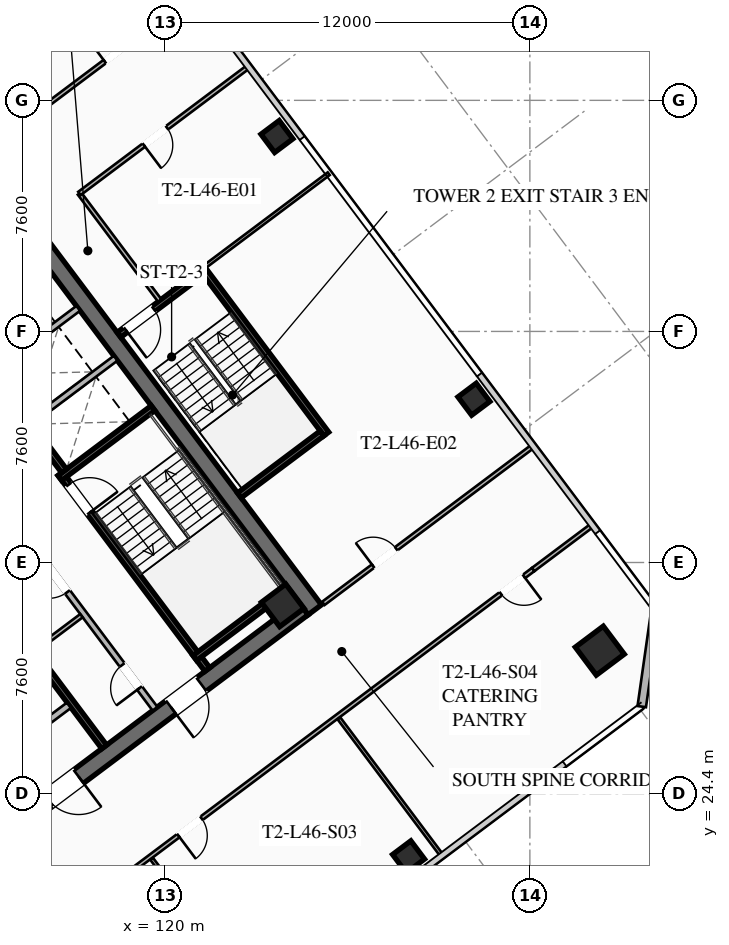
"""IFC4 building model, lengths in metres.
Left out: names, types, materials, properties, quantities, classifications, styles, units other than length and angle.
Written with IfcOpenShell. Run it as: python <this file> out.ifc"""

import sys

from ifc_helpers import new_model, si_unit, direction, frame, frame_2d, origin, origin_2d, place, context, subcontext, project, spatial, rectangle, hollow_rectangle, extrude, element, fill, save


model = new_model("IFC4")
c1 = context("Model", 3, precision=1e-05, world=origin(), true_north=direction((0.0, 1.0)))
c2 = subcontext(c1, "Body", "Model", "MODEL_VIEW")
j1 = project(units=[si_unit("LENGTHUNIT", "METRE"), si_unit("PLANEANGLEUNIT", "RADIAN")], contexts=[c1])
p1 = place(None, origin())
s1 = spatial("IfcSite", under=j1, at=p1, CompositionType="ELEMENT")
p2 = place(p1, origin())
s2 = spatial("IfcBuilding", under=s1, at=p2, CompositionType="ELEMENT")
p3 = place(p2, frame((0.0, 0.0, 171.2)))
s3 = spatial("IfcBuildingStorey", under=s2, at=p3, CompositionType="ELEMENT", Elevation=171.2)
p4 = place(p3, frame((115.564, 42.923, 0.0), z_axis=(0.0, 0.0, 1.0), x_axis=(0.600005007985, -0.799996243986, 0.0)))
e1 = element("IfcWall", 1, at=p4, inside=s3, PredefinedType="SHEAR", context=c2, shape_type="SweptSolid", body=[
    extrude(rectangle(XDim=15.6, YDim=0.55, at=frame_2d((7.8, 0.0))), origin(), (0.0, 0.0, 1.0), 3.55),
])
p5 = place(p3, frame((124.539, 30.498, 0.0), z_axis=(0.0, 0.0, 1.0), x_axis=(-0.799998054672, -0.600002593761, 0.0)))
e2 = element("IfcWall", 2, at=p5, inside=s3, PredefinedType="SHEAR", context=c2, shape_type="SweptSolid", body=[
    extrude(rectangle(XDim=15.06, YDim=0.55, at=frame_2d((7.53, 0.0))), origin(), (0.0, 0.0, 1.0), 3.55),
])
p6 = place(p5, frame((9.23, 0.0, 0.0)))
e3 = element("IfcOpeningElement", 3, at=p6, cuts=e2, PredefinedType="OPENING", context=c2, shape_type="SweptSolid", body=[
    extrude(rectangle(XDim=1.25, YDim=2.25, at=frame_2d((0.625, 1.125))), frame((0.0, 0.285, 0.0), z_axis=(0.0, -1.0, 0.0), x_axis=(1.0, 0.0, 0.0)), (0.0, 0.0, 1.0), 0.57),
])
p7 = place(p5, frame((4.18, 0.0, 0.0)))
e4 = element("IfcOpeningElement", 4, at=p7, cuts=e2, PredefinedType="OPENING", context=c2, shape_type="SweptSolid", body=[
    extrude(rectangle(XDim=1.25, YDim=2.25, at=frame_2d((0.625, 1.125))), frame((0.0, 0.285, 0.0), z_axis=(0.0, -1.0, 0.0), x_axis=(1.0, 0.0, 0.0)), (0.0, 0.0, 1.0), 0.57),
])
p8 = place(p3, frame((123.87, 30.59, 0.0), z_axis=(0.0, 0.0, 1.0), x_axis=(0.799999996291, 0.600000004945, 0.0)))
e5 = element("IfcColumn", 5, at=p8, inside=s3, PredefinedType="COLUMN", context=c2, shape_type="SweptSolid", body=[
    extrude(hollow_rectangle(XDim=1.0, YDim=1.0, WallThickness=0.04, at=origin_2d()), origin(), (0.0, 0.0, 1.0), 3.37),
])
p9 = place(p3, frame((134.3, 29.1, 0.0), z_axis=(0.0, 0.0, 1.0), x_axis=(0.799999996291, 0.600000004945, 0.0)))
e6 = element("IfcColumn", 6, at=p9, inside=s3, PredefinedType="COLUMN", context=c2, shape_type="SweptSolid", body=[
    extrude(hollow_rectangle(XDim=1.15, YDim=1.15, WallThickness=0.045, at=origin_2d()), origin(), (0.0, 0.0, 1.0), 3.37),
])
for number, where, z_axis, x_axis in (
    (7, (128.01, 22.32, 0.0), (0.0, 0.0, 1.0), (0.8, 0.6, 0.0)),
    (8, (130.16, 37.37, 0.0), (0.0, 0.0, 1.0), (0.8, 0.6, 0.0)),
    (9, (123.68, 46.01, 0.0), (0.0, 0.0, 1.0), (0.8, 0.6, 0.0)),
):
    element("IfcColumn", number, at=place(p3, frame(where, z_axis=z_axis, x_axis=x_axis)), inside=s3, PredefinedType="COLUMN", context=c2, shape_type="SweptSolid", body=[
        extrude(hollow_rectangle(XDim=0.75, YDim=0.75, WallThickness=0.032, at=origin_2d()), origin(), (0.0, 0.0, 1.0), 3.37),
    ])
p10 = place(p3, frame((136.14, 30.48, 0.0), z_axis=(0.0, 0.0, 1.0), x_axis=(-0.141410847992, -0.989950994782, 0.0)))
e10 = element("IfcWall", 10, at=p10, inside=s3, PredefinedType="SOLIDWALL", context=c2, shape_type="SweptSolid", body=[
    extrude(rectangle(XDim=3.253, YDim=0.28, at=frame_2d((1.626, 0.0))), origin(), (0.0, 0.0, 1.0), 3.37),
])
p11 = place(p3, frame((116.56, 34.92, 0.0), z_axis=(0.0, 0.0, 1.0), x_axis=(0.59999029481, -0.8000072788, 0.0)))
e11 = element("IfcWall", 11, at=p11, inside=s3, PredefinedType="SHEAR", context=c2, shape_type="SweptSolid", body=[
    extrude(rectangle(XDim=8.05, YDim=0.2, at=frame_2d((4.025, 0.0))), origin(), (0.0, 0.0, 1.0), 3.37),
])
p12 = place(p11, frame((0.45, 0.0, 0.0)))
e12 = element("IfcOpeningElement", 12, at=p12, cuts=e11, PredefinedType="OPENING", context=c2, shape_type="SweptSolid", body=[
    extrude(rectangle(XDim=1.15, YDim=2.2, at=frame_2d((0.575, 1.1))), frame((0.0, 0.11, 0.0), z_axis=(0.0, -1.0, 0.0), x_axis=(1.0, 0.0, 0.0)), (0.0, 0.0, 1.0), 0.22),
])
for number, where, z_axis, x_axis in (
    (13, (116.54, 34.78, 0.0), (0.0, 0.0, 1.0), (0.8, 0.6, 0.0)),
    (14, (120.98, 28.86, 0.0), (0.0, 0.0, 1.0), (0.8, 0.6, 0.0)),
):
    element("IfcWall", number, at=place(p3, frame(where, z_axis=z_axis, x_axis=x_axis)), inside=s3, PredefinedType="SHEAR", context=c2, shape_type="SweptSolid", body=[
        extrude(rectangle(XDim=3.83, YDim=0.2, at=frame_2d((1.915, 0.0))), origin(), (0.0, 0.0, 1.0), 3.37),
    ])
p13 = place(p3, frame((117.998, 25.936, 0.0), z_axis=(0.0, 0.0, 1.0), x_axis=(-0.600002693989, 0.799997979501, 0.0)))
e15 = element("IfcWall", 15, at=p13, inside=s3, PredefinedType="SHEAR", context=c2, shape_type="SweptSolid", body=[
    extrude(rectangle(XDim=14.5, YDim=0.2, at=frame_2d((7.25, 0.0))), origin(), (0.0, 0.0, 1.0), 3.37),
])
p14 = place(p3, frame((114.316, 25.412, 0.0), z_axis=(0.0, 0.0, 1.0), x_axis=(0.800018601094, 0.59997519774, 0.0)))
e16 = element("IfcWall", 16, at=p14, inside=s3, PredefinedType="SOLIDWALL", context=c2, shape_type="SweptSolid", body=[
    extrude(rectangle(XDim=3.15, YDim=0.22, at=frame_2d((1.575, 0.0))), origin(), (0.0, 0.0, 1.0), 2.723),
])
p15 = place(p14, frame((0.95, 0.0, 0.0)))
e17 = element("IfcOpeningElement", 17, at=p15, cuts=e16, PredefinedType="OPENING", context=c2, shape_type="SweptSolid", body=[
    extrude(rectangle(XDim=1.25, YDim=2.25, at=frame_2d((0.625, 1.125))), frame((0.0, 0.12, 0.0), z_axis=(0.0, -1.0, 0.0), x_axis=(1.0, 0.0, 0.0)), (0.0, 0.0, 1.0), 0.24),
])
p16 = place(p3, frame((112.81, 40.17, 0.0), z_axis=(0.0, 0.0, 1.0), x_axis=(0.599993943644, -0.800004542231, 0.0)))
e18 = element("IfcWall", 18, at=p16, inside=s3, PredefinedType="SHEAR", context=c2, shape_type="SweptSolid", body=[
    extrude(rectangle(XDim=6.45, YDim=0.2, at=frame_2d((3.225, 0.0))), origin(), (0.0, 0.0, 1.0), 3.37),
])
for number, where, z_axis, x_axis in (
    (19, (115.59, 36.63, 0.0), (0.0, 0.0, 1.0), (0.8, 0.6, 0.0)),
    (20, (114.36, 38.27, 0.0), (0.0, 0.0, 1.0), (0.8, 0.6, 0.0)),
):
    element("IfcWall", number, at=place(p3, frame(where, z_axis=z_axis, x_axis=x_axis)), inside=s3, PredefinedType="SOLIDWALL", context=c2, shape_type="SweptSolid", body=[
        extrude(rectangle(XDim=3.48, YDim=0.2, at=frame_2d((1.74, 0.0))), origin(), (0.0, 0.0, 1.0), 3.37),
    ])
p17 = place(p3, frame((119.67, 27.19, 0.0), z_axis=(0.0, 0.0, 1.0), x_axis=(-0.599988677396, 0.800008491828, 0.0)))
e21 = element("IfcWall", 21, at=p17, inside=s3, PredefinedType="SOLIDWALL", context=c2, shape_type="SweptSolid", body=[
    extrude(rectangle(XDim=6.9, YDim=0.2, at=frame_2d((3.45, 0.0))), origin(), (0.0, 0.0, 1.0), 2.723),
])
p18 = place(p17, frame((0.85, 0.0, 0.0)))
e22 = element("IfcOpeningElement", 22, at=p18, cuts=e21, PredefinedType="OPENING", context=c2, shape_type="SweptSolid", body=[
    extrude(rectangle(XDim=0.95, YDim=2.05, at=frame_2d((0.475, 1.025))), frame((0.0, 0.11, 0.0), z_axis=(0.0, -1.0, 0.0), x_axis=(1.0, 0.0, 0.0)), (0.0, 0.0, 1.0), 0.22),
])
p19 = place(p17, frame((4.8, 0.0, 0.0)))
e23 = element("IfcOpeningElement", 23, at=p19, cuts=e21, PredefinedType="OPENING", context=c2, shape_type="SweptSolid", body=[
    extrude(rectangle(XDim=1.05, YDim=2.2, at=frame_2d((0.525, 1.1))), frame((0.0, 0.11, 0.0), z_axis=(0.0, -1.0, 0.0), x_axis=(1.0, 0.0, 0.0)), (0.0, 0.0, 1.0), 0.22),
])
p20 = place(p3, frame((115.746, 29.122, 0.0), z_axis=(0.0, 0.0, 1.0), x_axis=(0.8, 0.6, 0.0)))
e24 = element("IfcWall", 24, at=p20, inside=s3, PredefinedType="PARTITIONING", context=c2, shape_type="SweptSolid", body=[
    extrude(rectangle(XDim=1.88, YDim=0.135, at=frame_2d((0.94, 0.0))), origin(), (0.0, 0.0, 1.0), 2.723),
])
p21 = place(p3, frame((125.304, 36.228, 0.0), z_axis=(0.0, 0.0, 1.0), x_axis=(-0.59998851072, 0.800008616831, 0.0)))
e25 = element("IfcWall", 25, at=p21, inside=s3, PredefinedType="SHEAR", context=c2, shape_type="SweptSolid", body=[
    extrude(rectangle(XDim=6.8, YDim=0.2, at=frame_2d((3.4, 0.0))), origin(), (0.0, 0.0, 1.0), 3.37),
])
p22 = place(p3, frame((121.204, 41.528, 0.0), z_axis=(0.0, 0.0, 1.0), x_axis=(-0.800017232136, -0.599977023131, 0.0)))
e26 = element("IfcWall", 26, at=p22, inside=s3, PredefinedType="SHEAR", context=c2, shape_type="SweptSolid", body=[
    extrude(rectangle(XDim=3.4, YDim=0.2, at=frame_2d((1.7, 0.0))), origin(), (0.0, 0.0, 1.0), 3.37),
])
p23 = place(p22, frame((1.975, 0.0, 0.0)))
e27 = element("IfcOpeningElement", 27, at=p23, cuts=e26, PredefinedType="OPENING", context=c2, shape_type="SweptSolid", body=[
    extrude(rectangle(XDim=1.15, YDim=2.2, at=frame_2d((0.575, 1.1))), frame((0.0, 0.11, 0.0), z_axis=(0.0, -1.0, 0.0), x_axis=(1.0, 0.0, 0.0)), (0.0, 0.0, 1.0), 0.22),
])
p24 = place(p3, frame((122.444, 34.208, 0.0), z_axis=(0.0, 0.0, 1.0), x_axis=(0.79999138319, 0.600011488909, 0.0)))
e28 = element("IfcWall", 28, at=p24, inside=s3, PredefinedType="SHEAR", context=c2, shape_type="SweptSolid", body=[
    extrude(rectangle(XDim=3.4, YDim=0.2, at=frame_2d((1.7, 0.0))), origin(), (0.0, 0.0, 1.0), 3.37),
])
p25 = place(p3, frame((119.824, 40.618, 0.0), z_axis=(0.0, 0.0, 1.0), x_axis=(-0.599982243973, 0.800013316712, 0.0)))
e29 = element("IfcWall", 29, at=p25, inside=s3, PredefinedType="PARTITIONING", context=c2, shape_type="SweptSolid", body=[
    extrude(rectangle(XDim=4.4, YDim=0.135, at=frame_2d((2.2, 0.0))), origin(), (0.0, 0.0, 1.0), 2.723),
])
p26 = place(p3, frame((96.058, 32.006, 0.0), z_axis=(0.0, 0.0, 1.0), x_axis=(0.8, 0.6, 0.0)))
e30 = element("IfcWall", 30, at=p26, inside=s3, PredefinedType="PARTITIONING", context=c2, shape_type="SweptSolid", body=[
    extrude(rectangle(XDim=28.7, YDim=0.135, at=frame_2d((14.35, 0.0))), origin(), (0.0, 0.0, 1.0), 2.723),
])
p27 = place(p26, frame((0.3, 0.0, 0.0)))
e31 = element("IfcOpeningElement", 31, at=p27, cuts=e30, PredefinedType="OPENING", context=c2, shape_type="SweptSolid", body=[
    extrude(rectangle(XDim=0.95, YDim=2.05, at=frame_2d((0.475, 1.025))), frame((0.0, 0.077, 0.0), z_axis=(0.0, -1.0, 0.0), x_axis=(1.0, 0.0, 0.0)), (0.0, 0.0, 1.0), 0.155),
])
p28 = place(p26, frame((10.01, 0.0, 0.0)))
e32 = element("IfcOpeningElement", 32, at=p28, cuts=e30, PredefinedType="OPENING", context=c2, shape_type="SweptSolid", body=[
    extrude(rectangle(XDim=0.95, YDim=2.05, at=frame_2d((0.475, 1.025))), frame((0.0, 0.077, 0.0), z_axis=(0.0, -1.0, 0.0), x_axis=(1.0, 0.0, 0.0)), (0.0, 0.0, 1.0), 0.155),
])
p29 = place(p26, frame((14.033, 0.0, 0.0)))
e33 = element("IfcOpeningElement", 33, at=p29, cuts=e30, PredefinedType="OPENING", context=c2, shape_type="SweptSolid", body=[
    extrude(rectangle(XDim=0.95, YDim=2.05, at=frame_2d((0.475, 1.025))), frame((0.0, 0.077, 0.0), z_axis=(0.0, -1.0, 0.0), x_axis=(1.0, 0.0, 0.0)), (0.0, 0.0, 1.0), 0.155),
])
p30 = place(p26, frame((27.45, 0.0, 0.0)))
e34 = element("IfcOpeningElement", 34, at=p30, cuts=e30, PredefinedType="OPENING", context=c2, shape_type="SweptSolid", body=[
    extrude(rectangle(XDim=0.95, YDim=2.05, at=frame_2d((0.475, 1.025))), frame((0.0, 0.077, 0.0), z_axis=(0.0, -1.0, 0.0), x_axis=(1.0, 0.0, 0.0)), (0.0, 0.0, 1.0), 0.155),
])
p31 = place(p3, frame((132.11, 31.77, 0.0), z_axis=(0.0, 0.0, 1.0), x_axis=(-0.800003062365, -0.599995916825, 0.0)))
e35 = element("IfcWall", 35, at=p31, inside=s3, PredefinedType="PARTITIONING", context=c2, shape_type="SweptSolid", body=[
    extrude(rectangle(XDim=28.7, YDim=0.135, at=frame_2d((14.35, 0.0))), origin(), (0.0, 0.0, 1.0), 2.723),
])
p32 = place(p31, frame((27.37, 0.0, 0.0)))
e36 = element("IfcOpeningElement", 36, at=p32, cuts=e35, PredefinedType="OPENING", context=c2, shape_type="SweptSolid", body=[
    extrude(rectangle(XDim=0.95, YDim=2.05, at=frame_2d((0.475, 1.025))), frame((0.0, 0.077, 0.0), z_axis=(0.0, -1.0, 0.0), x_axis=(1.0, 0.0, 0.0)), (0.0, 0.0, 1.0), 0.155),
])
p33 = place(p31, frame((17.698, 0.0, 0.0)))
e37 = element("IfcOpeningElement", 37, at=p33, cuts=e35, PredefinedType="OPENING", context=c2, shape_type="SweptSolid", body=[
    extrude(rectangle(XDim=0.95, YDim=2.05, at=frame_2d((0.475, 1.025))), frame((0.0, 0.077, 0.0), z_axis=(0.0, -1.0, 0.0), x_axis=(1.0, 0.0, 0.0)), (0.0, 0.0, 1.0), 0.155),
])
p34 = place(p31, frame((13.639, 0.0, 0.0)))
e38 = element("IfcOpeningElement", 38, at=p34, cuts=e35, PredefinedType="OPENING", context=c2, shape_type="SweptSolid", body=[
    extrude(rectangle(XDim=0.95, YDim=2.05, at=frame_2d((0.475, 1.025))), frame((0.0, 0.077, 0.0), z_axis=(0.0, -1.0, 0.0), x_axis=(1.0, 0.0, 0.0)), (0.0, 0.0, 1.0), 0.155),
])
p35 = place(p31, frame((0.38, 0.0, 0.0)))
e39 = element("IfcOpeningElement", 39, at=p35, cuts=e35, PredefinedType="OPENING", context=c2, shape_type="SweptSolid", body=[
    extrude(rectangle(XDim=0.95, YDim=2.05, at=frame_2d((0.475, 1.025))), frame((0.0, 0.077, 0.0), z_axis=(0.0, -1.0, 0.0), x_axis=(1.0, 0.0, 0.0)), (0.0, 0.0, 1.0), 0.155),
])
p36 = place(p3, frame((132.11, 31.77, 0.0), z_axis=(0.0, 0.0, 1.0), x_axis=(0.799975885537, 0.600032151272, 0.0)))
e40 = element("IfcWall", 40, at=p36, inside=s3, PredefinedType="PARTITIONING", context=c2, shape_type="SweptSolid", body=[
    extrude(rectangle(XDim=2.43, YDim=0.135, at=frame_2d((1.215, 0.0))), origin(), (0.0, 0.0, 1.0), 2.723),
])
for number, where, z_axis, x_axis in (
    (41, (122.948, 17.736, 0.0), (0.0, 0.0, 1.0), (-0.6, 0.8, 0.0)),
    (42, (129.108, 22.356, 0.0), (0.0, 0.0, 1.0), (-0.6, 0.8, 0.0)),
):
    element("IfcWall", number, at=place(p3, frame(where, z_axis=z_axis, x_axis=x_axis)), inside=s3, PredefinedType="PARTITIONING", context=c2, shape_type="SweptSolid", body=[
        extrude(rectangle(XDim=5.65, YDim=0.11, at=frame_2d((2.825, 0.0))), origin(), (0.0, 0.0, 1.0), 2.723),
    ])
p37 = place(p3, frame((122.744, 48.308, 0.0), z_axis=(0.0, 0.0, 1.0), x_axis=(-0.79997892247, -0.600028102345, 0.0)))
e43 = element("IfcWall", 43, at=p37, inside=s3, PredefinedType="PARTITIONING", context=c2, shape_type="SweptSolid", body=[
    extrude(rectangle(XDim=6.95, YDim=0.135, at=frame_2d((3.475, 0.0))), origin(), (0.0, 0.0, 1.0), 2.723),
])
p38 = place(p37, frame((3.35, 0.0, 0.0)))
e44 = element("IfcOpeningElement", 44, at=p38, cuts=e43, PredefinedType="OPENING", context=c2, shape_type="SweptSolid", body=[
    extrude(rectangle(XDim=0.95, YDim=2.05, at=frame_2d((0.475, 1.025))), frame((0.0, 0.077, 0.0), z_axis=(0.0, -1.0, 0.0), x_axis=(1.0, 0.0, 0.0)), (0.0, 0.0, 1.0), 0.155),
])
p39 = place(p3, frame((125.208, 30.656, 0.0), z_axis=(0.0, 0.0, 1.0), x_axis=(0.800006797429, 0.599990936654, 0.0)))
e45 = element("IfcWall", 45, at=p39, inside=s3, PredefinedType="PARTITIONING", context=c2, shape_type="SweptSolid", body=[
    extrude(rectangle(XDim=8.62, YDim=0.135, at=frame_2d((4.31, 0.0))), origin(), (0.0, 0.0, 1.0), 2.723),
])
p40 = place(p39, frame((2.045, 0.0, 0.0)))
e46 = element("IfcOpeningElement", 46, at=p40, cuts=e45, PredefinedType="OPENING", context=c2, shape_type="SweptSolid", body=[
    extrude(rectangle(XDim=0.95, YDim=2.05, at=frame_2d((0.475, 1.025))), frame((0.0, 0.077, 0.0), z_axis=(0.0, -1.0, 0.0), x_axis=(1.0, 0.0, 0.0)), (0.0, 0.0, 1.0), 0.155),
])
p41 = place(p3, frame((125.384, 44.788, 0.0), z_axis=(0.0, 0.0, 1.0), x_axis=(-0.8, -0.6, 0.0)))
e47 = element("IfcWall", 47, at=p41, inside=s3, PredefinedType="PARTITIONING", context=c2, shape_type="SweptSolid", body=[
    extrude(rectangle(XDim=5.1, YDim=0.11, at=frame_2d((2.55, 0.0))), origin(), (0.0, 0.0, 1.0), 2.723),
])
p42 = place(p6, origin())
e48 = element("IfcDoor", 48, at=p42, inside=s3, OperationType="SINGLE_SWING_LEFT", PredefinedType="DOOR", context=c2, shape_type="SweptSolid", body=[
    extrude(rectangle(XDim=1.25, YDim=2.25, at=frame_2d((0.625, 1.125))), frame((0.0, 0.025, 0.0), z_axis=(0.0, -1.0, 0.0), x_axis=(1.0, 0.0, 0.0)), (0.0, 0.0, 1.0), 0.05),
])
fill(e3, e48)
p43 = place(p7, origin())
e49 = element("IfcDoor", 49, at=p43, inside=s3, OperationType="SINGLE_SWING_RIGHT", PredefinedType="DOOR", context=c2, shape_type="SweptSolid", body=[
    extrude(rectangle(XDim=1.25, YDim=2.25, at=frame_2d((0.625, 1.125))), frame((0.0, 0.025, 0.0), z_axis=(0.0, -1.0, 0.0), x_axis=(1.0, 0.0, 0.0)), (0.0, 0.0, 1.0), 0.05),
])
fill(e4, e49)
p44 = place(p12, origin())
e50 = element("IfcDoor", 50, at=p44, inside=s3, OperationType="SINGLE_SWING_RIGHT", PredefinedType="DOOR", context=c2, shape_type="SweptSolid", body=[
    extrude(rectangle(XDim=1.15, YDim=2.2, at=frame_2d((0.575, 1.1))), frame((0.0, 0.025, 0.0), z_axis=(0.0, -1.0, 0.0), x_axis=(1.0, 0.0, 0.0)), (0.0, 0.0, 1.0), 0.05),
])
fill(e12, e50)
p45 = place(p18, origin())
e51 = element("IfcDoor", 51, at=p45, inside=s3, OperationType="SINGLE_SWING_LEFT", PredefinedType="DOOR", context=c2, shape_type="SweptSolid", body=[
    extrude(rectangle(XDim=0.95, YDim=2.05, at=frame_2d((0.475, 1.025))), frame((0.0, 0.025, 0.0), z_axis=(0.0, -1.0, 0.0), x_axis=(1.0, 0.0, 0.0)), (0.0, 0.0, 1.0), 0.05),
])
fill(e22, e51)
p46 = place(p19, origin())
e52 = element("IfcDoor", 52, at=p46, inside=s3, OperationType="SINGLE_SWING_RIGHT", PredefinedType="DOOR", context=c2, shape_type="SweptSolid", body=[
    extrude(rectangle(XDim=1.05, YDim=2.2, at=frame_2d((0.525, 1.1))), frame((0.0, 0.025, 0.0), z_axis=(0.0, -1.0, 0.0), x_axis=(1.0, 0.0, 0.0)), (0.0, 0.0, 1.0), 0.05),
])
fill(e23, e52)
p47 = place(p23, origin())
e53 = element("IfcDoor", 53, at=p47, inside=s3, OperationType="SINGLE_SWING_RIGHT", PredefinedType="DOOR", context=c2, shape_type="SweptSolid", body=[
    extrude(rectangle(XDim=1.15, YDim=2.2, at=frame_2d((0.575, 1.1))), frame((0.0, 0.025, 0.0), z_axis=(0.0, -1.0, 0.0), x_axis=(1.0, 0.0, 0.0)), (0.0, 0.0, 1.0), 0.05),
])
fill(e27, e53)
p48 = place(p30, origin())
e54 = element("IfcDoor", 54, at=p48, inside=s3, OperationType="SINGLE_SWING_LEFT", PredefinedType="DOOR", context=c2, shape_type="SweptSolid", body=[
    extrude(rectangle(XDim=0.95, YDim=2.05, at=frame_2d((0.475, 1.025))), frame((0.0, 0.025, 0.0), z_axis=(0.0, -1.0, 0.0), x_axis=(1.0, 0.0, 0.0)), (0.0, 0.0, 1.0), 0.05),
])
fill(e34, e54)
p49 = place(p34, origin())
e55 = element("IfcDoor", 55, at=p49, inside=s3, OperationType="SINGLE_SWING_RIGHT", PredefinedType="DOOR", context=c2, shape_type="SweptSolid", body=[
    extrude(rectangle(XDim=0.95, YDim=2.05, at=frame_2d((0.475, 1.025))), frame((0.0, 0.025, 0.0), z_axis=(0.0, -1.0, 0.0), x_axis=(1.0, 0.0, 0.0)), (0.0, 0.0, 1.0), 0.05),
])
fill(e38, e55)
p50 = place(p35, origin())
e56 = element("IfcDoor", 56, at=p50, inside=s3, OperationType="SINGLE_SWING_LEFT", PredefinedType="DOOR", context=c2, shape_type="SweptSolid", body=[
    extrude(rectangle(XDim=0.95, YDim=2.05, at=frame_2d((0.475, 1.025))), frame((0.0, 0.025, 0.0), z_axis=(0.0, -1.0, 0.0), x_axis=(1.0, 0.0, 0.0)), (0.0, 0.0, 1.0), 0.05),
])
fill(e39, e56)
p51 = place(p38, origin())
e57 = element("IfcDoor", 57, at=p51, inside=s3, OperationType="SINGLE_SWING_RIGHT", PredefinedType="DOOR", context=c2, shape_type="SweptSolid", body=[
    extrude(rectangle(XDim=0.95, YDim=2.05, at=frame_2d((0.475, 1.025))), frame((0.0, 0.025, 0.0), z_axis=(0.0, -1.0, 0.0), x_axis=(1.0, 0.0, 0.0)), (0.0, 0.0, 1.0), 0.05),
])
fill(e44, e57)
p52 = place(p40, origin())
e58 = element("IfcDoor", 58, at=p52, inside=s3, OperationType="SINGLE_SWING_LEFT", PredefinedType="DOOR", context=c2, shape_type="SweptSolid", body=[
    extrude(rectangle(XDim=0.95, YDim=2.05, at=frame_2d((0.475, 1.025))), frame((0.0, 0.025, 0.0), z_axis=(0.0, -1.0, 0.0), x_axis=(1.0, 0.0, 0.0)), (0.0, 0.0, 1.0), 0.05),
])
fill(e46, e58)
save(model, sys.argv[1])
